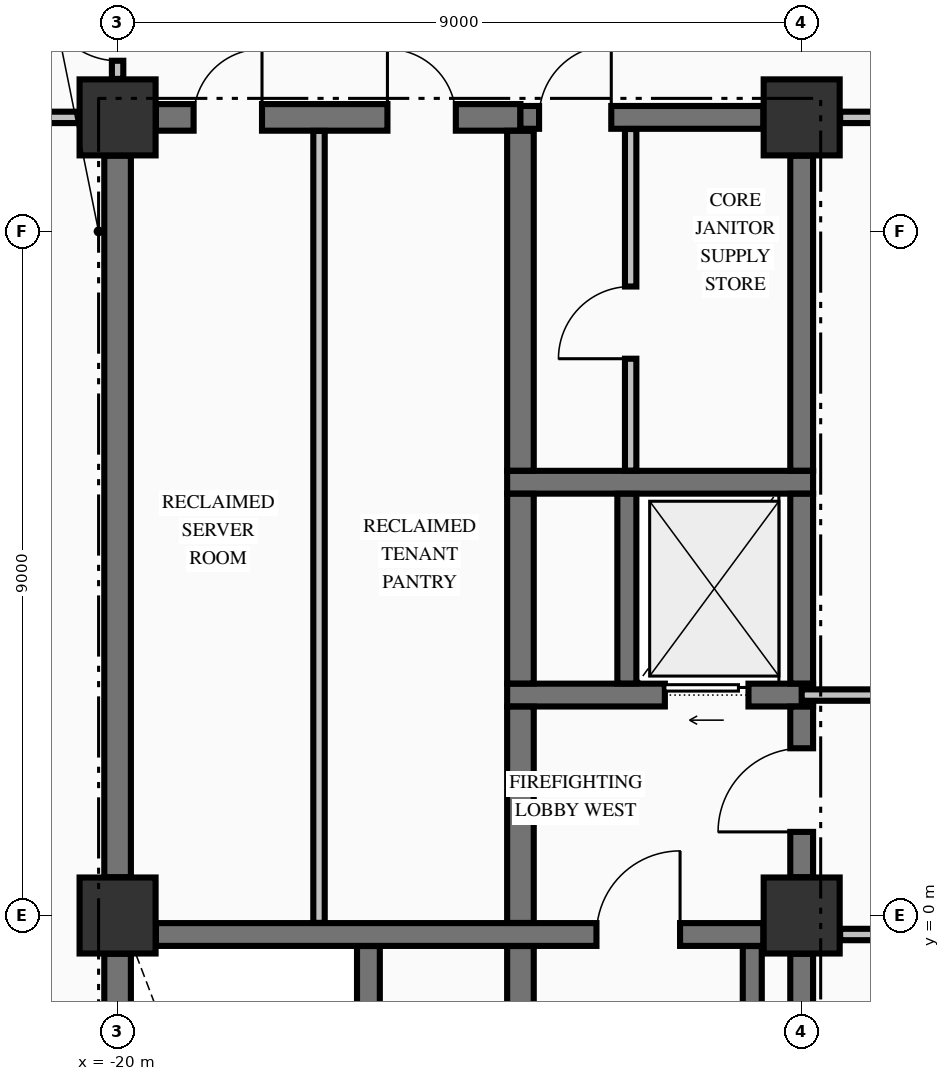
"""IFC4 building model, lengths in metres.
Left out: names, types, materials, properties, quantities, classifications, styles, units other than length and angle.
Written with IfcOpenShell. Run it as: python <this file> out.ifc"""

import sys

from ifc_helpers import new_model, si_unit, direction, frame, frame_2d, origin, origin_2d, place, context, subcontext, project, spatial, rectangle, extrude, element, fill, save


model = new_model("IFC4")
c1 = context("Model", 3, precision=1e-05, world=origin(), true_north=direction((0.0, 1.0)))
c2 = subcontext(c1, "Body", "Model", "MODEL_VIEW")
j1 = project(units=[si_unit("LENGTHUNIT", "METRE"), si_unit("PLANEANGLEUNIT", "RADIAN")], contexts=[c1])
p1 = place(None, origin())
s1 = spatial("IfcSite", under=j1, at=p1, CompositionType="ELEMENT")
p2 = place(p1, origin())
s2 = spatial("IfcBuilding", under=s1, at=p2, CompositionType="ELEMENT")
p3 = place(p2, frame((0.0, 0.0, 94.93)))
s3 = spatial("IfcBuildingStorey", under=s2, at=p3, CompositionType="ELEMENT", Elevation=94.93)
for number, where, z_axis, x_axis in (
    (1, (-20.0, 10.5, -0.25), (0.0, 0.0, 1.0), (1.0, 0.0, 0.0)),
    (2, (-11.0, 0.0, -0.25), (0.0, 0.0, 1.0), (1.0, 0.0, 0.0)),
    (3, (-11.0, 10.5, -0.25), (0.0, 0.0, 1.0), (1.0, 0.0, 0.0)),
    (4, (-20.0, 0.0, -0.25), (0.0, 0.0, 1.0), (1.0, 0.0, 0.0)),
):
    element("IfcColumn", number, at=place(p3, frame(where, z_axis=z_axis, x_axis=x_axis)), inside=s3, PredefinedType="COLUMN", context=c2, shape_type="SweptSolid", body=[
        extrude(rectangle(XDim=1.0, YDim=1.0, at=origin_2d()), origin(), (0.0, 0.0, 1.0), 3.545),
    ])
p4 = place(p3, frame((-19.496, -0.25, 0.0), z_axis=(0.0, 0.0, 1.0), x_axis=(1.0, 0.0, 0.0)))
e5 = element("IfcWall", 5, at=p4, inside=s3, PredefinedType="SHEAR", context=c2, shape_type="SweptSolid", body=[
    extrude(rectangle(XDim=7.992, YDim=0.3, at=frame_2d((3.996, 0.0))), origin(), (0.0, 0.0, 1.0), 3.295),
])
p5 = place(p4, frame((5.796, 0.0, 0.0)))
e6 = element("IfcOpeningElement", 6, at=p5, cuts=e5, PredefinedType="OPENING", context=c2, shape_type="SweptSolid", body=[
    extrude(rectangle(XDim=1.1, YDim=2.15, at=frame_2d((0.55, 1.075))), frame((0.0, 0.16, 0.0), z_axis=(0.0, -1.0, 0.0), x_axis=(1.0, 0.0, 0.0)), (0.0, 0.0, 1.0), 0.32),
])
p6 = place(p3, frame((-14.875, 2.9, 0.0), z_axis=(0.0, 0.0, 1.0), x_axis=(1.0, 0.0, 0.0)))
e7 = element("IfcWall", 7, at=p6, inside=s3, PredefinedType="SHEAR", context=c2, shape_type="SweptSolid", body=[
    extrude(rectangle(XDim=4.025, YDim=0.3, at=frame_2d((2.012, 0.0))), origin(), (0.0, 0.0, 1.0), 3.295),
])
p7 = place(p6, frame((2.075, 0.0, 0.0)))
e8 = element("IfcOpeningElement", 8, at=p7, cuts=e7, PredefinedType="OPENING", context=c2, shape_type="SweptSolid", body=[
    extrude(rectangle(XDim=1.1, YDim=2.2, at=frame_2d((0.55, 1.1))), frame((0.0, 0.16, 0.0), z_axis=(0.0, -1.0, 0.0), x_axis=(1.0, 0.0, 0.0)), (0.0, 0.0, 1.0), 0.32),
])
p8 = place(p3, frame((-14.875, 5.7, 0.0), z_axis=(0.0, 0.0, 1.0), x_axis=(1.0, 0.0, 0.0)))
e9 = element("IfcWall", 9, at=p8, inside=s3, PredefinedType="SHEAR", context=c2, shape_type="SweptSolid", body=[
    extrude(rectangle(XDim=4.025, YDim=0.3, at=frame_2d((2.012, 0.0))), origin(), (0.0, 0.0, 1.0), 3.295),
])
p9 = place(p3, frame((-19.496, 10.5, 0.0), z_axis=(0.0, 0.0, 1.0), x_axis=(1.0, 0.0, 0.0)))
e10 = element("IfcWall", 10, at=p9, inside=s3, PredefinedType="SHEAR", context=c2, shape_type="SweptSolid", body=[
    extrude(rectangle(XDim=4.796, YDim=0.35, at=frame_2d((2.398, 0.0))), origin(), (0.0, 0.0, 1.0), 3.295),
])
p10 = place(p9, frame((0.496, 0.0, 0.0)))
e11 = element("IfcOpeningElement", 11, at=p10, cuts=e10, PredefinedType="OPENING", context=c2, shape_type="SweptSolid", body=[
    extrude(rectangle(XDim=0.9, YDim=2.15, at=frame_2d((0.45, 1.075))), frame((0.0, 0.185, 0.0), z_axis=(0.0, -1.0, 0.0), x_axis=(1.0, 0.0, 0.0)), (0.0, 0.0, 1.0), 0.37),
])
p11 = place(p9, frame((3.046, 0.0, 0.0)))
e12 = element("IfcOpeningElement", 12, at=p11, cuts=e10, PredefinedType="OPENING", context=c2, shape_type="SweptSolid", body=[
    extrude(rectangle(XDim=0.9, YDim=2.15, at=frame_2d((0.45, 1.075))), frame((0.0, 0.185, 0.0), z_axis=(0.0, -1.0, 0.0), x_axis=(1.0, 0.0, 0.0)), (0.0, 0.0, 1.0), 0.37),
])
p12 = place(p3, frame((-14.7, 10.5, 0.0), z_axis=(0.0, 0.0, 1.0), x_axis=(1.0, 0.0, 0.0)))
e13 = element("IfcWall", 13, at=p12, inside=s3, PredefinedType="SHEAR", context=c2, shape_type="SweptSolid", body=[
    extrude(rectangle(XDim=3.196, YDim=0.3, at=frame_2d((1.598, 0.0))), origin(), (0.0, 0.0, 1.0), 3.295),
])
p13 = place(p12, frame((0.245, 0.0, 0.0)))
e14 = element("IfcOpeningElement", 14, at=p13, cuts=e13, PredefinedType="OPENING", context=c2, shape_type="SweptSolid", body=[
    extrude(rectangle(XDim=0.95, YDim=2.15, at=frame_2d((0.475, 1.075))), frame((0.0, 0.16, 0.0), z_axis=(0.0, -1.0, 0.0), x_axis=(1.0, 0.0, 0.0)), (0.0, 0.0, 1.0), 0.32),
])
p14 = place(p3, frame((-10.494, -0.25, 0.0), z_axis=(0.0, 0.0, 1.0), x_axis=(1.0, 0.0, 0.0)))
e15 = element("IfcWall", 15, at=p14, inside=s3, PredefinedType="PARTITIONING", context=c2, shape_type="SweptSolid", body=[
    extrude(rectangle(XDim=20.988, YDim=0.15, at=frame_2d((10.494, 0.0))), origin(), (0.0, 0.0, 1.0), 3.295),
])
p15 = place(p14, frame((12.594, 0.0, 0.0)))
e16 = element("IfcOpeningElement", 16, at=p15, cuts=e15, PredefinedType="OPENING", context=c2, shape_type="SweptSolid", body=[
    extrude(rectangle(XDim=1.1, YDim=2.15, at=frame_2d((0.55, 1.075))), frame((0.0, 0.085, 0.0), z_axis=(0.0, -1.0, 0.0), x_axis=(1.0, 0.0, 0.0)), (0.0, 0.0, 1.0), 0.17),
])
p16 = place(p14, frame((5.249, 0.0, 0.0)))
e17 = element("IfcOpeningElement", 17, at=p16, cuts=e15, PredefinedType="OPENING", context=c2, shape_type="SweptSolid", body=[
    extrude(rectangle(XDim=1.05, YDim=2.15, at=frame_2d((0.525, 1.075))), frame((0.0, 0.085, 0.0), z_axis=(0.0, -1.0, 0.0), x_axis=(1.0, 0.0, 0.0)), (0.0, 0.0, 1.0), 0.17),
])
p17 = place(p14, frame((17.399, 0.0, 0.0)))
e18 = element("IfcOpeningElement", 18, at=p17, cuts=e15, PredefinedType="OPENING", context=c2, shape_type="SweptSolid", body=[
    extrude(rectangle(XDim=0.95, YDim=2.15, at=frame_2d((0.475, 1.075))), frame((0.0, 0.085, 0.0), z_axis=(0.0, -1.0, 0.0), x_axis=(1.0, 0.0, 0.0)), (0.0, 0.0, 1.0), 0.17),
])
p18 = place(p3, frame((-11.0, 2.9, 0.0), z_axis=(0.0, 0.0, 1.0), x_axis=(1.0, 0.0, 0.0)))
e19 = element("IfcWall", 19, at=p18, inside=s3, PredefinedType="PARTITIONING", context=c2, shape_type="SweptSolid", body=[
    extrude(rectangle(XDim=22.0, YDim=0.15, at=frame_2d((11.0, 0.0))), origin(), (0.0, 0.0, 1.0), 3.295),
])
p19 = place(p18, frame((13.1, 0.0, 0.0)))
e20 = element("IfcOpeningElement", 20, at=p19, cuts=e19, PredefinedType="OPENING", context=c2, shape_type="SweptSolid", body=[
    extrude(rectangle(XDim=1.1, YDim=2.15, at=frame_2d((0.55, 1.075))), frame((0.0, 0.085, 0.0), z_axis=(0.0, -1.0, 0.0), x_axis=(1.0, 0.0, 0.0)), (0.0, 0.0, 1.0), 0.17),
])
p20 = place(p18, frame((5.755, 0.0, 0.0)))
e21 = element("IfcOpeningElement", 21, at=p20, cuts=e19, PredefinedType="OPENING", context=c2, shape_type="SweptSolid", body=[
    extrude(rectangle(XDim=1.05, YDim=2.15, at=frame_2d((0.525, 1.075))), frame((0.0, 0.085, 0.0), z_axis=(0.0, -1.0, 0.0), x_axis=(1.0, 0.0, 0.0)), (0.0, 0.0, 1.0), 0.17),
])
p21 = place(p18, frame((15.755, 0.0, 0.0)))
e22 = element("IfcOpeningElement", 22, at=p21, cuts=e19, PredefinedType="OPENING", context=c2, shape_type="SweptSolid", body=[
    extrude(rectangle(XDim=0.95, YDim=2.15, at=frame_2d((0.475, 1.075))), frame((0.0, 0.085, 0.0), z_axis=(0.0, -1.0, 0.0), x_axis=(1.0, 0.0, 0.0)), (0.0, 0.0, 1.0), 0.17),
])
p22 = place(p18, frame((19.385, 0.0, 0.0)))
e23 = element("IfcOpeningElement", 23, at=p22, cuts=e19, PredefinedType="OPENING", context=c2, shape_type="SweptSolid", body=[
    extrude(rectangle(XDim=0.95, YDim=2.15, at=frame_2d((0.475, 1.075))), frame((0.0, 0.085, 0.0), z_axis=(0.0, -1.0, 0.0), x_axis=(1.0, 0.0, 0.0)), (0.0, 0.0, 1.0), 0.17),
])
p23 = place(p3, frame((-22.835, 10.5, 0.0), z_axis=(0.0, 0.0, 1.0), x_axis=(1.0, 0.0, 0.0)))
e24 = element("IfcWall", 24, at=p23, inside=s3, PredefinedType="PARTITIONING", context=c2, shape_type="SweptSolid", body=[
    extrude(rectangle(XDim=2.329, YDim=0.15, at=frame_2d((1.165, 0.0))), origin(), (0.0, 0.0, 1.0), 3.295),
])
p24 = place(p23, frame((0.835, 0.0, 0.0)))
e25 = element("IfcOpeningElement", 25, at=p24, cuts=e24, PredefinedType="OPENING", context=c2, shape_type="SweptSolid", body=[
    extrude(rectangle(XDim=1.0, YDim=2.15, at=frame_2d((0.5, 1.075))), frame((0.0, 0.085, 0.0), z_axis=(0.0, -1.0, 0.0), x_axis=(1.0, 0.0, 0.0)), (0.0, 0.0, 1.0), 0.17),
])
p25 = place(p3, frame((-10.494, 10.5, 0.0), z_axis=(0.0, 0.0, 1.0), x_axis=(1.0, 0.0, 0.0)))
e26 = element("IfcWall", 26, at=p25, inside=s3, PredefinedType="PARTITIONING", context=c2, shape_type="SweptSolid", body=[
    extrude(rectangle(XDim=20.988, YDim=0.15, at=frame_2d((10.494, 0.0))), origin(), (0.0, 0.0, 1.0), 3.295),
])
p26 = place(p25, frame((12.594, 0.0, 0.0)))
e27 = element("IfcOpeningElement", 27, at=p26, cuts=e26, PredefinedType="OPENING", context=c2, shape_type="SweptSolid", body=[
    extrude(rectangle(XDim=1.1, YDim=2.15, at=frame_2d((0.55, 1.075))), frame((0.0, 0.085, 0.0), z_axis=(0.0, -1.0, 0.0), x_axis=(1.0, 0.0, 0.0)), (0.0, 0.0, 1.0), 0.17),
])
p27 = place(p3, frame((-20.0, -9.446, 0.0), z_axis=(0.0, 0.0, 1.0), x_axis=(0.0, 1.0, 0.0)))
e28 = element("IfcWall", 28, at=p27, inside=s3, PredefinedType="SHEAR", context=c2, shape_type="SweptSolid", body=[
    extrude(rectangle(XDim=8.942, YDim=0.35, at=frame_2d((4.471, 0.0))), origin(), (0.0, 0.0, 1.0), 3.295),
])
p28 = place(p3, frame((-20.0, 0.504, 0.0), z_axis=(0.0, 0.0, 1.0), x_axis=(0.0, 1.0, 0.0)))
e29 = element("IfcWall", 29, at=p28, inside=s3, PredefinedType="SHEAR", context=c2, shape_type="SweptSolid", body=[
    extrude(rectangle(XDim=9.492, YDim=0.35, at=frame_2d((4.746, 0.0))), origin(), (0.0, 0.0, 1.0), 3.295),
])
p29 = place(p3, frame((-16.7, -9.773, 0.0), z_axis=(0.0, 0.0, 1.0), x_axis=(0.0, 1.0, 0.0)))
e30 = element("IfcWall", 30, at=p29, inside=s3, PredefinedType="SHEAR", context=c2, shape_type="SweptSolid", body=[
    extrude(rectangle(XDim=9.371, YDim=0.3, at=frame_2d((4.686, 0.0))), origin(), (0.0, 0.0, 1.0), 3.295),
])
p30 = place(p3, frame((-14.7, -9.773, 0.0), z_axis=(0.0, 0.0, 1.0), x_axis=(0.0, 1.0, 0.0)))
e31 = element("IfcWall", 31, at=p30, inside=s3, PredefinedType="SHEAR", context=c2, shape_type="SweptSolid", body=[
    extrude(rectangle(XDim=9.371, YDim=0.35, at=frame_2d((4.686, 0.0))), origin(), (0.0, 0.0, 1.0), 3.295),
])
p31 = place(p3, frame((-14.7, -0.098, 0.0), z_axis=(0.0, 0.0, 1.0), x_axis=(0.0, 1.0, 0.0)))
e32 = element("IfcWall", 32, at=p31, inside=s3, PredefinedType="SHEAR", context=c2, shape_type="SweptSolid", body=[
    extrude(rectangle(XDim=2.846, YDim=0.35, at=frame_2d((1.423, 0.0))), origin(), (0.0, 0.0, 1.0), 3.295),
])
p32 = place(p3, frame((-14.7, 3.052, 0.0), z_axis=(0.0, 0.0, 1.0), x_axis=(0.0, 1.0, 0.0)))
e33 = element("IfcWall", 33, at=p32, inside=s3, PredefinedType="SHEAR", context=c2, shape_type="SweptSolid", body=[
    extrude(rectangle(XDim=2.496, YDim=0.35, at=frame_2d((1.248, 0.0))), origin(), (0.0, 0.0, 1.0), 3.295),
])
p33 = place(p3, frame((-14.7, 5.852, 0.0), z_axis=(0.0, 0.0, 1.0), x_axis=(0.0, 1.0, 0.0)))
e34 = element("IfcWall", 34, at=p33, inside=s3, PredefinedType="SHEAR", context=c2, shape_type="SweptSolid", body=[
    extrude(rectangle(XDim=4.471, YDim=0.35, at=frame_2d((2.235, 0.0))), origin(), (0.0, 0.0, 1.0), 3.295),
])
p34 = place(p3, frame((-13.3, 3.052, 0.0), z_axis=(0.0, 0.0, 1.0), x_axis=(0.0, 1.0, 0.0)))
e35 = element("IfcWall", 35, at=p34, inside=s3, PredefinedType="SOLIDWALL", context=c2, shape_type="SweptSolid", body=[
    extrude(rectangle(XDim=2.496, YDim=0.25, at=frame_2d((1.248, 0.0))), origin(), (0.0, 0.0, 1.0), 3.295),
])
p35 = place(p3, frame((-11.65, -9.798, 0.0), z_axis=(0.0, 0.0, 1.0), x_axis=(0.0, 1.0, 0.0)))
e36 = element("IfcWall", 36, at=p35, inside=s3, PredefinedType="SOLIDWALL", context=c2, shape_type="SweptSolid", body=[
    extrude(rectangle(XDim=9.396, YDim=0.25, at=frame_2d((4.698, 0.0))), origin(), (0.0, 0.0, 1.0), 3.295),
])
p36 = place(p3, frame((-11.0, -9.446, 0.0), z_axis=(0.0, 0.0, 1.0), x_axis=(0.0, 1.0, 0.0)))
e37 = element("IfcWall", 37, at=p36, inside=s3, PredefinedType="SHEAR", context=c2, shape_type="SweptSolid", body=[
    extrude(rectangle(XDim=8.942, YDim=0.3, at=frame_2d((4.471, 0.0))), origin(), (0.0, 0.0, 1.0), 3.295),
])
p37 = place(p3, frame((-11.0, 0.504, 0.0), z_axis=(0.0, 0.0, 1.0), x_axis=(0.0, 1.0, 0.0)))
e38 = element("IfcWall", 38, at=p37, inside=s3, PredefinedType="SHEAR", context=c2, shape_type="SweptSolid", body=[
    extrude(rectangle(XDim=2.244, YDim=0.3, at=frame_2d((1.122, 0.0))), origin(), (0.0, 0.0, 1.0), 3.295),
])
p38 = place(p37, frame((0.596, 0.0, 0.0)))
e39 = element("IfcOpeningElement", 39, at=p38, cuts=e38, PredefinedType="OPENING", context=c2, shape_type="SweptSolid", body=[
    extrude(rectangle(XDim=1.1, YDim=2.15, at=frame_2d((0.55, 1.075))), frame((0.0, 0.16, 0.0), z_axis=(0.0, -1.0, 0.0), x_axis=(1.0, 0.0, 0.0)), (0.0, 0.0, 1.0), 0.32),
])
p39 = place(p3, frame((-11.0, 3.052, 0.0), z_axis=(0.0, 0.0, 1.0), x_axis=(0.0, 1.0, 0.0)))
e40 = element("IfcWall", 40, at=p39, inside=s3, PredefinedType="SHEAR", context=c2, shape_type="SweptSolid", body=[
    extrude(rectangle(XDim=2.496, YDim=0.3, at=frame_2d((1.248, 0.0))), origin(), (0.0, 0.0, 1.0), 3.295),
])
p40 = place(p3, frame((-11.0, 5.852, 0.0), z_axis=(0.0, 0.0, 1.0), x_axis=(0.0, 1.0, 0.0)))
e41 = element("IfcWall", 41, at=p40, inside=s3, PredefinedType="SHEAR", context=c2, shape_type="SweptSolid", body=[
    extrude(rectangle(XDim=4.144, YDim=0.3, at=frame_2d((2.072, 0.0))), origin(), (0.0, 0.0, 1.0), 3.295),
])
p41 = place(p3, frame((-20.0, 11.006, 0.0), z_axis=(0.0, 0.0, 1.0), x_axis=(0.0, 1.0, 0.0)))
e42 = element("IfcWall", 42, at=p41, inside=s3, PredefinedType="PARTITIONING", context=c2, shape_type="SweptSolid", body=[
    extrude(rectangle(XDim=1.866, YDim=0.15, at=frame_2d((0.933, 0.0))), origin(), (0.0, 0.0, 1.0), 2.785),
])
p42 = place(p41, frame((0.239, 0.0, 0.0)))
e43 = element("IfcOpeningElement", 43, at=p42, cuts=e42, PredefinedType="OPENING", context=c2, shape_type="SweptSolid", body=[
    extrude(rectangle(XDim=0.95, YDim=2.15, at=frame_2d((0.475, 1.075))), frame((0.0, 0.085, 0.0), z_axis=(0.0, -1.0, 0.0), x_axis=(1.0, 0.0, 0.0)), (0.0, 0.0, 1.0), 0.17),
])
p43 = place(p3, frame((-17.35, -0.097, 0.0), z_axis=(0.0, 0.0, 1.0), x_axis=(0.0, 1.0, 0.0)))
e44 = element("IfcWall", 44, at=p43, inside=s3, PredefinedType="PARTITIONING", context=c2, shape_type="SweptSolid", body=[
    extrude(rectangle(XDim=10.419, YDim=0.15, at=frame_2d((5.209, 0.0))), origin(), (0.0, 0.0, 1.0), 3.295),
])
p44 = place(p3, frame((-13.25, 5.853, 0.0), z_axis=(0.0, 0.0, 1.0), x_axis=(0.0, 1.0, 0.0)))
e45 = element("IfcWall", 45, at=p44, inside=s3, PredefinedType="PARTITIONING", context=c2, shape_type="SweptSolid", body=[
    extrude(rectangle(XDim=4.494, YDim=0.15, at=frame_2d((2.247, 0.0))), origin(), (0.0, 0.0, 1.0), 3.295),
])
p45 = place(p44, frame((1.472, 0.0, 0.0)))
e46 = element("IfcOpeningElement", 46, at=p45, cuts=e45, PredefinedType="OPENING", context=c2, shape_type="SweptSolid", body=[
    extrude(rectangle(XDim=0.95, YDim=2.15, at=frame_2d((0.475, 1.075))), frame((0.0, 0.085, 0.0), z_axis=(0.0, -1.0, 0.0), x_axis=(1.0, 0.0, 0.0)), (0.0, 0.0, 1.0), 0.17),
])
p46 = place(p5, origin())
e47 = element("IfcDoor", 47, at=p46, inside=s3, OperationType="SINGLE_SWING_RIGHT", PredefinedType="DOOR", context=c2, shape_type="SweptSolid", body=[
    extrude(rectangle(XDim=1.1, YDim=2.15, at=frame_2d((0.55, 1.075))), frame((0.0, 0.025, 0.0), z_axis=(0.0, -1.0, 0.0), x_axis=(1.0, 0.0, 0.0)), (0.0, 0.0, 1.0), 0.05),
])
fill(e6, e47)
p47 = place(p38, origin())
e48 = element("IfcDoor", 48, at=p47, inside=s3, OperationType="SINGLE_SWING_LEFT", PredefinedType="DOOR", context=c2, shape_type="SweptSolid", body=[
    extrude(rectangle(XDim=1.1, YDim=2.15, at=frame_2d((0.55, 1.075))), frame((0.0, 0.025, 0.0), z_axis=(0.0, -1.0, 0.0), x_axis=(1.0, 0.0, 0.0)), (0.0, 0.0, 1.0), 0.05),
])
fill(e39, e48)
p48 = place(p7, origin())
e49 = element("IfcDoor", 49, at=p48, inside=s3, OperationType="SLIDING_TO_LEFT", PredefinedType="DOOR", context=c2, shape_type="SweptSolid", body=[
    extrude(rectangle(XDim=1.1, YDim=2.2, at=frame_2d((0.55, 1.1))), frame((0.0, 0.025, 0.0), z_axis=(0.0, -1.0, 0.0), x_axis=(1.0, 0.0, 0.0)), (0.0, 0.0, 1.0), 0.05),
])
fill(e8, e49)
p49 = place(p13, origin())
e50 = element("IfcDoor", 50, at=p49, inside=s3, OperationType="SINGLE_SWING_RIGHT", PredefinedType="DOOR", context=c2, shape_type="SweptSolid", body=[
    extrude(rectangle(XDim=0.95, YDim=2.15, at=frame_2d((0.475, 1.075))), frame((0.0, 0.025, 0.0), z_axis=(0.0, -1.0, 0.0), x_axis=(1.0, 0.0, 0.0)), (0.0, 0.0, 1.0), 0.05),
])
fill(e14, e50)
p50 = place(p45, origin())
e51 = element("IfcDoor", 51, at=p50, inside=s3, OperationType="SINGLE_SWING_LEFT", PredefinedType="DOOR", context=c2, shape_type="SweptSolid", body=[
    extrude(rectangle(XDim=0.95, YDim=2.15, at=frame_2d((0.475, 1.075))), frame((0.0, 0.025, 0.0), z_axis=(0.0, -1.0, 0.0), x_axis=(1.0, 0.0, 0.0)), (0.0, 0.0, 1.0), 0.05),
])
fill(e46, e51)
p51 = place(p10, origin())
e52 = element("IfcDoor", 52, at=p51, inside=s3, OperationType="SINGLE_SWING_RIGHT", PredefinedType="DOOR", context=c2, shape_type="SweptSolid", body=[
    extrude(rectangle(XDim=0.9, YDim=2.15, at=frame_2d((0.45, 1.075))), frame((0.0, 0.025, 0.0), z_axis=(0.0, -1.0, 0.0), x_axis=(1.0, 0.0, 0.0)), (0.0, 0.0, 1.0), 0.05),
])
fill(e11, e52)
p52 = place(p11, origin())
e53 = element("IfcDoor", 53, at=p52, inside=s3, OperationType="SINGLE_SWING_LEFT", PredefinedType="DOOR", context=c2, shape_type="SweptSolid", body=[
    extrude(rectangle(XDim=0.9, YDim=2.15, at=frame_2d((0.45, 1.075))), frame((0.0, 0.025, 0.0), z_axis=(0.0, -1.0, 0.0), x_axis=(1.0, 0.0, 0.0)), (0.0, 0.0, 1.0), 0.05),
])
fill(e12, e53)
p53 = place(p42, origin())
e54 = element("IfcDoor", 54, at=p53, inside=s3, OperationType="SINGLE_SWING_RIGHT", PredefinedType="DOOR", context=c2, shape_type="SweptSolid", body=[
    extrude(rectangle(XDim=0.95, YDim=2.15, at=frame_2d((0.475, 1.075))), frame((0.0, 0.025, 0.0), z_axis=(0.0, -1.0, 0.0), x_axis=(1.0, 0.0, 0.0)), (0.0, 0.0, 1.0), 0.05),
])
fill(e43, e54)
save(model, sys.argv[1])
